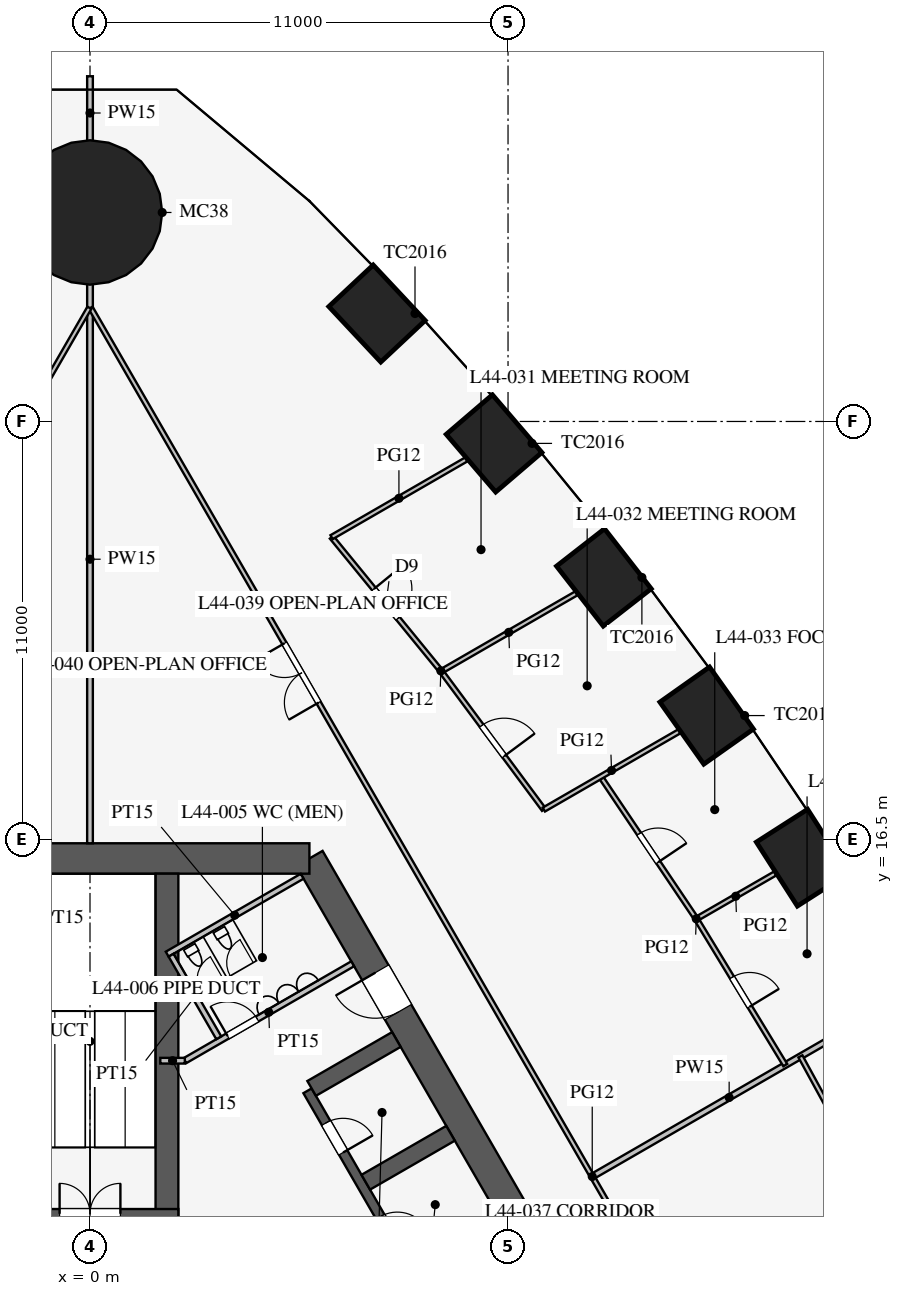
"""IFC4 building model, lengths in metres.
Left out: names, types, materials, properties, quantities, classifications, styles, units other than length and angle.
Written with IfcOpenShell. Run it as: python <this file> out.ifc"""

import sys

from ifc_helpers import new_model, si_unit, direction, frame, frame_2d, origin, origin_2d, place, context, subcontext, project, spatial, rectangle, circle, extrude, element, fill, save


model = new_model("IFC4")
c1 = context("Model", 3, precision=1e-05, world=origin(), true_north=direction((0.0, 1.0)))
c2 = subcontext(c1, "Body", "Model", "MODEL_VIEW")
j1 = project(units=[si_unit("LENGTHUNIT", "METRE"), si_unit("PLANEANGLEUNIT", "RADIAN")], contexts=[c1])
p1 = place(None, origin())
s1 = spatial("IfcSite", under=j1, at=p1, CompositionType="ELEMENT")
p2 = place(p1, origin())
s2 = spatial("IfcBuilding", under=s1, at=p2, CompositionType="ELEMENT")
p3 = place(p2, frame((0.0, 0.0, 193.9)))
s3 = spatial("IfcBuildingStorey", under=s2, at=p3, CompositionType="ELEMENT", Elevation=193.9)
for number, where, z_axis, x_axis in (
    (1, (18.748, 16.02, 0.0), (0.0, 0.0, 1.0), (-0.539, 0.842, 0.0)),
    (2, (16.227, 19.761, 0.0), (0.0, 0.0, 1.0), (-0.577, 0.816, 0.0)),
    (3, (13.522, 23.396, 0.0), (0.0, 0.0, 1.0), (-0.615, 0.789, 0.0)),
    (4, (10.632, 26.923, 0.0), (0.0, 0.0, 1.0), (-0.651, 0.759, 0.0)),
    (5, (7.552, 30.341, 0.0), (0.0, 0.0, 1.0), (-0.684, 0.73, 0.0)),
):
    element("IfcColumn", number, at=place(p3, frame(where, z_axis=z_axis, x_axis=x_axis)), inside=s3, PredefinedType="COLUMN", context=c2, shape_type="SweptSolid", body=[
        extrude(rectangle(XDim=2.0, YDim=1.6, at=origin_2d()), origin(), (0.0, 0.0, 1.0), 4.2),
    ])
p4 = place(p3, frame((0.0, 33.0, 0.0), z_axis=(0.0, 0.0, 1.0), x_axis=(1.0, 0.0, 0.0)))
e6 = element("IfcColumn", 6, at=p4, inside=s3, PredefinedType="COLUMN", context=c2, shape_type="SweptSolid", body=[
    extrude(circle(Radius=1.9, at=origin_2d()), origin(), (0.0, 0.0, 1.0), 4.2),
])
p5 = place(p3, frame((16.743, -3.0, 0.0), z_axis=(0.0, 0.0, 1.0), x_axis=(-0.500002442456, 0.866023993627, 0.0)))
e7 = element("IfcWall", 7, at=p5, inside=s3, PredefinedType="SHEAR", context=c2, shape_type="SweptSolid", body=[
    extrude(rectangle(XDim=21.939, YDim=0.8, at=frame_2d((10.97, 0.0))), origin(), (0.0, 0.0, 1.0), 4.2),
])
p6 = place(p5, frame((17.27, 0.0, 0.0)))
e8 = element("IfcOpeningElement", 8, at=p6, cuts=e7, PredefinedType="OPENING", context=c2, shape_type="SweptSolid", body=[
    extrude(rectangle(XDim=1.2, YDim=2.1, at=frame_2d((0.6, 1.05))), frame((0.0, 0.41, 0.0), z_axis=(0.0, -1.0, 0.0), x_axis=(1.0, 0.0, 0.0)), (0.0, 0.0, 1.0), 0.82),
])
p7 = place(p5, frame((3.47, 0.0, 0.0)))
e9 = element("IfcOpeningElement", 9, at=p7, cuts=e7, PredefinedType="OPENING", context=c2, shape_type="SweptSolid", body=[
    extrude(rectangle(XDim=1.2, YDim=2.1, at=frame_2d((0.6, 1.05))), frame((0.0, 0.41, 0.0), z_axis=(0.0, -1.0, 0.0), x_axis=(1.0, 0.0, 0.0)), (0.0, 0.0, 1.0), 0.82),
])
p8 = place(p3, frame((5.773, 16.0, 0.0), z_axis=(0.0, 0.0, 1.0), x_axis=(-1.0, 0.0, 0.0)))
e10 = element("IfcWall", 10, at=p8, inside=s3, PredefinedType="SHEAR", context=c2, shape_type="SweptSolid", body=[
    extrude(rectangle(XDim=11.547, YDim=0.8, at=frame_2d((5.773, 0.0))), origin(), (0.0, 0.0, 1.0), 4.2),
])
p9 = place(p3, frame((11.424, 0.014, 0.0), z_axis=(0.0, 0.0, 1.0), x_axis=(-0.500001763848, 0.866024385424, 0.0)))
e11 = element("IfcWall", 11, at=p9, inside=s3, PredefinedType="SHEAR", context=c2, shape_type="SweptSolid", body=[
    extrude(rectangle(XDim=11.4, YDim=0.25, at=frame_2d((5.7, 0.0))), origin(), (0.0, 0.0, 1.0), 4.2),
])
p10 = place(p9, frame((0.975, 0.0, 0.0)))
e12 = element("IfcOpeningElement", 12, at=p10, cuts=e11, PredefinedType="OPENING", context=c2, shape_type="SweptSolid", body=[
    extrude(rectangle(XDim=0.9, YDim=2.1, at=frame_2d((0.45, 1.05))), frame((0.0, 0.135, 0.0), z_axis=(0.0, -1.0, 0.0), x_axis=(1.0, 0.0, 0.0)), (0.0, 0.0, 1.0), 0.27),
])
p11 = place(p9, frame((3.825, 0.0, 0.0)))
e13 = element("IfcOpeningElement", 13, at=p11, cuts=e11, PredefinedType="OPENING", context=c2, shape_type="SweptSolid", body=[
    extrude(rectangle(XDim=0.9, YDim=2.1, at=frame_2d((0.45, 1.05))), frame((0.0, 0.135, 0.0), z_axis=(0.0, -1.0, 0.0), x_axis=(1.0, 0.0, 0.0)), (0.0, 0.0, 1.0), 0.27),
])
p12 = place(p9, frame((6.675, 0.0, 0.0)))
e14 = element("IfcOpeningElement", 14, at=p12, cuts=e11, PredefinedType="OPENING", context=c2, shape_type="SweptSolid", body=[
    extrude(rectangle(XDim=0.9, YDim=2.1, at=frame_2d((0.45, 1.05))), frame((0.0, 0.135, 0.0), z_axis=(0.0, -1.0, 0.0), x_axis=(1.0, 0.0, 0.0)), (0.0, 0.0, 1.0), 0.27),
])
p13 = place(p9, frame((9.525, 0.0, 0.0)))
e15 = element("IfcOpeningElement", 15, at=p13, cuts=e11, PredefinedType="OPENING", context=c2, shape_type="SweptSolid", body=[
    extrude(rectangle(XDim=0.9, YDim=2.1, at=frame_2d((0.45, 1.05))), frame((0.0, 0.135, 0.0), z_axis=(0.0, -1.0, 0.0), x_axis=(1.0, 0.0, 0.0)), (0.0, 0.0, 1.0), 0.27),
])
p14 = place(p3, frame((7.257, 7.481, 0.0), z_axis=(0.0, 0.0, 1.0), x_axis=(0.866046643894, 0.499963209246, 0.0)))
e16 = element("IfcWall", 16, at=p14, inside=s3, PredefinedType="SHEAR", context=c2, shape_type="SweptSolid", body=[
    extrude(rectangle(XDim=2.575, YDim=0.45, at=frame_2d((1.288, 0.0))), origin(), (0.0, 0.0, 1.0), 4.2),
])
p15 = place(p3, frame((5.832, 9.949, 0.0), z_axis=(0.0, 0.0, 1.0), x_axis=(0.866029291668, 0.499993265928, 0.0)))
e17 = element("IfcWall", 17, at=p15, inside=s3, PredefinedType="SHEAR", context=c2, shape_type="SweptSolid", body=[
    extrude(rectangle(XDim=2.575, YDim=0.45, at=frame_2d((1.288, 0.0))), origin(), (0.0, 0.0, 1.0), 4.2),
])
p16 = place(p3, frame((2.025, 6.525, 0.0), z_axis=(0.0, 0.0, 1.0), x_axis=(0.0, 1.0, 0.0)))
e18 = element("IfcWall", 18, at=p16, inside=s3, PredefinedType="SHEAR", context=c2, shape_type="SweptSolid", body=[
    extrude(rectangle(XDim=9.075, YDim=0.6, at=frame_2d((4.538, 0.0))), origin(), (0.0, 0.0, 1.0), 4.2),
])
p17 = place(p3, frame((2.325, 6.65, 0.0), z_axis=(0.0, 0.0, 1.0), x_axis=(-1.0, 0.0, 0.0)))
e19 = element("IfcWall", 19, at=p17, inside=s3, PredefinedType="SHEAR", context=c2, shape_type="SweptSolid", body=[
    extrude(rectangle(XDim=4.65, YDim=0.25, at=frame_2d((2.325, 0.0))), origin(), (0.0, 0.0, 1.0), 4.2),
])
p18 = place(p17, frame((1.525, 0.0, 0.0)))
e20 = element("IfcOpeningElement", 20, at=p18, cuts=e19, PredefinedType="OPENING", context=c2, shape_type="SweptSolid", body=[
    extrude(rectangle(XDim=1.6, YDim=2.1, at=frame_2d((0.8, 1.05))), frame((0.0, 0.135, 0.0), z_axis=(0.0, -1.0, 0.0), x_axis=(1.0, 0.0, 0.0)), (0.0, 0.0, 1.0), 0.27),
])
p19 = place(p3, frame((2.495, 10.678, 0.0), z_axis=(0.0, 0.0, 1.0), x_axis=(0.86602216432, 0.500005610874, 0.0)))
e21 = element("IfcWall", 21, at=p19, inside=s3, PredefinedType="PARTITIONING", context=c2, shape_type="SweptSolid", body=[
    extrude(rectangle(XDim=5.1, YDim=0.15, at=frame_2d((2.55, 0.0))), origin(), (0.0, 0.0, 1.0), 4.0),
])
p20 = place(p19, frame((1.3, 0.0, 0.0)))
e22 = element("IfcOpeningElement", 22, at=p20, cuts=e21, PredefinedType="OPENING", context=c2, shape_type="SweptSolid", body=[
    extrude(rectangle(XDim=0.9, YDim=2.1, at=frame_2d((0.45, 1.05))), frame((0.0, 0.085, 0.0), z_axis=(0.0, -1.0, 0.0), x_axis=(1.0, 0.0, 0.0)), (0.0, 0.0, 1.0), 0.17),
])
p21 = place(p3, frame((2.495, 10.678, 0.0), z_axis=(0.0, 0.0, 1.0), x_axis=(-1.0, 0.0, 0.0)))
e23 = element("IfcWall", 23, at=p21, inside=s3, PredefinedType="PARTITIONING", context=c2, shape_type="SweptSolid", body=[
    extrude(rectangle(XDim=0.645, YDim=0.15, at=frame_2d((0.323, 0.0))), origin(), (0.0, 0.0, 1.0), 4.0),
])
p22 = place(p3, frame((2.031, 13.482, 0.0), z_axis=(0.0, 0.0, 1.0), x_axis=(0.866050731258, 0.499956128963, 0.0)))
e24 = element("IfcWall", 24, at=p22, inside=s3, PredefinedType="PARTITIONING", context=c2, shape_type="SweptSolid", body=[
    extrude(rectangle(XDim=4.1, YDim=0.15, at=frame_2d((2.05, 0.0))), origin(), (0.0, 0.0, 1.0), 4.0),
])
p23 = place(p3, frame((3.389, 11.281, 0.0), z_axis=(0.0, 0.0, 1.0), x_axis=(-0.499989096993, 0.866031698547, 0.0)))
e25 = element("IfcWall", 25, at=p23, inside=s3, PredefinedType="PARTITIONING", context=c2, shape_type="SweptSolid", body=[
    extrude(rectangle(XDim=2.51, YDim=0.15, at=frame_2d((1.255, 0.0))), origin(), (0.0, 0.0, 1.0), 4.0),
])
p24 = place(p3, frame((0.0, 16.4, 0.0), z_axis=(0.0, 0.0, 1.0), x_axis=(0.0, 1.0, 0.0)))
e26 = element("IfcWall", 26, at=p24, inside=s3, PredefinedType="PARTITIONING", context=c2, shape_type="SweptSolid", body=[
    extrude(rectangle(XDim=14.95, YDim=0.15, at=frame_2d((7.475, 0.0))), origin(), (0.0, 0.0, 1.0), 2.4),
])
p25 = place(p3, frame((0.0, 34.65, 0.0), z_axis=(0.0, 0.0, 1.0), x_axis=(0.0, 1.0, 0.0)))
e27 = element("IfcWall", 27, at=p25, inside=s3, PredefinedType="PARTITIONING", context=c2, shape_type="SweptSolid", body=[
    extrude(rectangle(XDim=1.935, YDim=0.15, at=frame_2d((0.967, 0.0))), origin(), (0.0, 0.0, 1.0), 2.4),
])
p26 = place(p3, frame((13.268, 7.66, 0.0), z_axis=(0.0, 0.0, 1.0), x_axis=(0.866019499219, 0.500010226868, 0.0)))
e28 = element("IfcWall", 28, at=p26, inside=s3, PredefinedType="PARTITIONING", context=c2, shape_type="SweptSolid", body=[
    extrude(rectangle(XDim=8.2, YDim=0.15, at=frame_2d((4.1, 0.0))), origin(), (0.0, 0.0, 1.0), 2.992),
])
p27 = place(p3, frame((26.415, -15.231, 0.0), z_axis=(0.0, 0.0, 1.0), x_axis=(-0.50000091641, 0.866024874695, 0.0)))
e29 = element("IfcWall", 29, at=p27, inside=s3, PredefinedType="PARTITIONING", context=c2, shape_type="SweptSolid", body=[
    extrude(rectangle(XDim=52.796, YDim=0.12, at=frame_2d((26.398, 0.0))), origin(), (0.0, 0.0, 1.0), 2.9),
])
p28 = place(p27, frame((10.2, 0.0, 0.15)))
e30 = element("IfcOpeningElement", 30, at=p28, cuts=e29, PredefinedType="OPENING", context=c2, shape_type="SweptSolid", body=[
    extrude(rectangle(XDim=1.8, YDim=2.1, at=frame_2d((0.9, 1.05))), frame((0.0, 0.07, 0.0), z_axis=(0.0, -1.0, 0.0), x_axis=(1.0, 0.0, 0.0)), (0.0, 0.0, 1.0), 0.14),
])
p29 = place(p27, frame((40.8, 0.0, 0.15)))
e31 = element("IfcOpeningElement", 31, at=p29, cuts=e29, PredefinedType="OPENING", context=c2, shape_type="SweptSolid", body=[
    extrude(rectangle(XDim=1.8, YDim=2.1, at=frame_2d((0.9, 1.05))), frame((0.0, 0.07, 0.0), z_axis=(0.0, -1.0, 0.0), x_axis=(1.0, 0.0, 0.0)), (0.0, 0.0, 1.0), 0.14),
])
p30 = place(p3, frame((18.295, 10.563, 0.0), z_axis=(0.0, 0.0, 1.0), x_axis=(-0.519766265397, 0.854308509472, 0.0)))
e32 = element("IfcWall", 32, at=p30, inside=s3, PredefinedType="PARTITIONING", context=c2, shape_type="SweptSolid", body=[
    extrude(rectangle(XDim=4.501, YDim=0.12, at=frame_2d((2.25, 0.0))), origin(), (0.0, 0.0, 1.0), 2.9),
])
p31 = place(p30, frame((1.8, 0.0, 0.15)))
e33 = element("IfcOpeningElement", 33, at=p31, cuts=e32, PredefinedType="OPENING", context=c2, shape_type="SweptSolid", body=[
    extrude(rectangle(XDim=0.9, YDim=2.1, at=frame_2d((0.45, 1.05))), frame((0.0, 0.07, 0.0), z_axis=(0.0, -1.0, 0.0), x_axis=(1.0, 0.0, 0.0)), (0.0, 0.0, 1.0), 0.14),
])
p32 = place(p3, frame((9.242, 20.924, 0.0), z_axis=(0.0, 0.0, 1.0), x_axis=(-0.632765292047, 0.774343647989, 0.0)))
e34 = element("IfcWall", 34, at=p32, inside=s3, PredefinedType="PARTITIONING", context=c2, shape_type="SweptSolid", body=[
    extrude(rectangle(XDim=4.559, YDim=0.12, at=frame_2d((2.28, 0.0))), origin(), (0.0, 0.0, 1.0), 2.9),
])
p33 = place(p32, frame((1.8, 0.0, 0.15)))
e35 = element("IfcOpeningElement", 35, at=p33, cuts=e34, PredefinedType="OPENING", context=c2, shape_type="SweptSolid", body=[
    extrude(rectangle(XDim=1.0, YDim=2.1, at=frame_2d((0.5, 1.05))), frame((0.0, 0.07, 0.0), z_axis=(0.0, -1.0, 0.0), x_axis=(1.0, 0.0, 0.0)), (0.0, 0.0, 1.0), 0.14),
])
p34 = place(p3, frame((15.956, 14.408, 0.0), z_axis=(0.0, 0.0, 1.0), x_axis=(-0.55850386778, 0.829501916619, 0.0)))
e36 = element("IfcWall", 36, at=p34, inside=s3, PredefinedType="PARTITIONING", context=c2, shape_type="SweptSolid", body=[
    extrude(rectangle(XDim=4.511, YDim=0.12, at=frame_2d((2.255, 0.0))), origin(), (0.0, 0.0, 1.0), 2.9),
])
p35 = place(p34, frame((1.8, 0.0, 0.15)))
e37 = element("IfcOpeningElement", 37, at=p35, cuts=e36, PredefinedType="OPENING", context=c2, shape_type="SweptSolid", body=[
    extrude(rectangle(XDim=0.9, YDim=2.1, at=frame_2d((0.45, 1.05))), frame((0.0, 0.07, 0.0), z_axis=(0.0, -1.0, 0.0), x_axis=(1.0, 0.0, 0.0)), (0.0, 0.0, 1.0), 0.14),
])
p36 = place(p3, frame((11.943, 17.287, 0.0), z_axis=(0.0, 0.0, 1.0), x_axis=(-0.59613842716, 0.802881669777, 0.0)))
e38 = element("IfcWall", 38, at=p36, inside=s3, PredefinedType="PARTITIONING", context=c2, shape_type="SweptSolid", body=[
    extrude(rectangle(XDim=4.53, YDim=0.12, at=frame_2d((2.265, 0.0))), origin(), (0.0, 0.0, 1.0), 2.9),
])
p37 = place(p36, frame((1.75, 0.0, 0.15)))
e39 = element("IfcOpeningElement", 39, at=p37, cuts=e38, PredefinedType="OPENING", context=c2, shape_type="SweptSolid", body=[
    extrude(rectangle(XDim=1.0, YDim=2.1, at=frame_2d((0.5, 1.05))), frame((0.0, 0.07, 0.0), z_axis=(0.0, -1.0, 0.0), x_axis=(1.0, 0.0, 0.0)), (0.0, 0.0, 1.0), 0.14),
])
p38 = place(p3, frame((20.854, 6.844, 0.0), z_axis=(0.0, 0.0, 1.0), x_axis=(-0.480014565702, 0.877260518155, 0.0)))
e40 = element("IfcWall", 40, at=p38, inside=s3, PredefinedType="PARTITIONING", context=c2, shape_type="SweptSolid", body=[
    extrude(rectangle(XDim=4.501, YDim=0.12, at=frame_2d((2.25, 0.0))), origin(), (0.0, 0.0, 1.0), 2.9),
])
p39 = place(p38, frame((1.8, 0.0, 0.15)))
e41 = element("IfcOpeningElement", 41, at=p39, cuts=e40, PredefinedType="OPENING", context=c2, shape_type="SweptSolid", body=[
    extrude(rectangle(XDim=0.9, YDim=2.1, at=frame_2d((0.45, 1.05))), frame((0.0, 0.07, 0.0), z_axis=(0.0, -1.0, 0.0), x_axis=(1.0, 0.0, 0.0)), (0.0, 0.0, 1.0), 0.14),
])
p40 = place(p3, frame((9.242, 20.924, 0.0), z_axis=(0.0, 0.0, 1.0), x_axis=(0.866016197294, 0.500015945769, 0.0)))
e42 = element("IfcWall", 42, at=p40, inside=s3, PredefinedType="PARTITIONING", context=c2, shape_type="SweptSolid", body=[
    extrude(rectangle(XDim=4.104, YDim=0.12, at=frame_2d((2.052, 0.0))), origin(), (0.0, 0.0, 1.0), 2.8),
])
p41 = place(p3, frame((6.357, 24.455, 0.0), z_axis=(0.0, 0.0, 1.0), x_axis=(0.866005746929, 0.500034045127, 0.0)))
e43 = element("IfcWall", 43, at=p41, inside=s3, PredefinedType="PARTITIONING", context=c2, shape_type="SweptSolid", body=[
    extrude(rectangle(XDim=4.092, YDim=0.12, at=frame_2d((2.046, 0.0))), origin(), (0.0, 0.0, 1.0), 2.8),
])
p42 = place(p3, frame((15.956, 14.408, 0.0), z_axis=(0.0, 0.0, 1.0), x_axis=(0.86598681336, 0.50006683462, 0.0)))
e44 = element("IfcWall", 44, at=p42, inside=s3, PredefinedType="PARTITIONING", context=c2, shape_type="SweptSolid", body=[
    extrude(rectangle(XDim=2.393, YDim=0.12, at=frame_2d((1.197, 0.0))), origin(), (0.0, 0.0, 1.0), 2.9),
])
p43 = place(p3, frame((11.943, 17.287, 0.0), z_axis=(0.0, 0.0, 1.0), x_axis=(0.866013591525, 0.500020458876, 0.0)))
e45 = element("IfcWall", 45, at=p43, inside=s3, PredefinedType="PARTITIONING", context=c2, shape_type="SweptSolid", body=[
    extrude(rectangle(XDim=4.113, YDim=0.12, at=frame_2d((2.057, 0.0))), origin(), (0.0, 0.0, 1.0), 2.9),
])
p44 = place(p3, frame((-0.016, 30.491, 0.0), z_axis=(0.0, 0.0, 1.0), x_axis=(-0.50000091641, -0.866024874695, 0.0)))
e46 = element("IfcWall", 46, at=p44, inside=s3, PredefinedType="PARTITIONING", context=c2, shape_type="SweptSolid", body=[
    extrude(rectangle(XDim=52.796, YDim=0.12, at=frame_2d((26.398, 0.0))), origin(), (0.0, 0.0, 1.0), 2.9),
])
p45 = place(p44, frame((10.2, 0.0, 0.15)))
e47 = element("IfcOpeningElement", 47, at=p45, cuts=e46, PredefinedType="OPENING", context=c2, shape_type="SweptSolid", body=[
    extrude(rectangle(XDim=1.8, YDim=2.1, at=frame_2d((0.9, 1.05))), frame((0.0, 0.07, 0.0), z_axis=(0.0, -1.0, 0.0), x_axis=(1.0, 0.0, 0.0)), (0.0, 0.0, 1.0), 0.14),
])
p46 = place(p44, frame((40.8, 0.0, 0.15)))
e48 = element("IfcOpeningElement", 48, at=p46, cuts=e46, PredefinedType="OPENING", context=c2, shape_type="SweptSolid", body=[
    extrude(rectangle(XDim=1.8, YDim=2.1, at=frame_2d((0.9, 1.05))), frame((0.0, 0.07, 0.0), z_axis=(0.0, -1.0, 0.0), x_axis=(1.0, 0.0, 0.0)), (0.0, 0.0, 1.0), 0.14),
])
p47 = place(p20, origin())
e49 = element("IfcDoor", 49, at=p47, inside=s3, OperationType="SINGLE_SWING_LEFT", PredefinedType="DOOR", context=c2, shape_type="SweptSolid", body=[
    extrude(rectangle(XDim=0.9, YDim=2.1, at=frame_2d((0.45, 1.05))), frame((0.0, 0.025, 0.0), z_axis=(0.0, -1.0, 0.0), x_axis=(1.0, 0.0, 0.0)), (0.0, 0.0, 1.0), 0.05),
])
fill(e22, e49)
p48 = place(p18, frame((1.6, 0.0, 0.0), z_axis=(0.0, 0.0, 1.0), x_axis=(-1.0, 0.0, 0.0)))
e50 = element("IfcDoor", 50, at=p48, inside=s3, OperationType="DOUBLE_DOOR_SINGLE_SWING", PredefinedType="DOOR", context=c2, shape_type="SweptSolid", body=[
    extrude(rectangle(XDim=1.6, YDim=2.1, at=frame_2d((0.8, 1.05))), frame((0.0, 0.025, 0.0), z_axis=(0.0, -1.0, 0.0), x_axis=(1.0, 0.0, 0.0)), (0.0, 0.0, 1.0), 0.05),
])
fill(e20, e50)
p49 = place(p6, origin())
e51 = element("IfcDoor", 51, at=p49, inside=s3, OperationType="SINGLE_SWING_RIGHT", PredefinedType="DOOR", context=c2, shape_type="SweptSolid", body=[
    extrude(rectangle(XDim=1.2, YDim=2.1, at=frame_2d((0.6, 1.05))), frame((0.0, 0.025, 0.0), z_axis=(0.0, -1.0, 0.0), x_axis=(1.0, 0.0, 0.0)), (0.0, 0.0, 1.0), 0.05),
])
fill(e8, e51)
p50 = place(p13, frame((0.9, 0.0, 0.0), z_axis=(0.0, 0.0, 1.0), x_axis=(-1.0, 0.0, 0.0)))
e52 = element("IfcDoor", 52, at=p50, inside=s3, OperationType="SINGLE_SWING_RIGHT", PredefinedType="DOOR", context=c2, shape_type="SweptSolid", body=[
    extrude(rectangle(XDim=0.9, YDim=2.1, at=frame_2d((0.45, 1.05))), frame((0.0, 0.025, 0.0), z_axis=(0.0, -1.0, 0.0), x_axis=(1.0, 0.0, 0.0)), (0.0, 0.0, 1.0), 0.05),
])
fill(e15, e52)
p51 = place(p33, frame((1.0, 0.0, 0.0), z_axis=(0.0, 0.0, 1.0), x_axis=(-1.0, 0.0, 0.0)))
e53 = element("IfcDoor", 53, at=p51, inside=s3, OperationType="SINGLE_SWING_LEFT", PredefinedType="DOOR", context=c2, shape_type="SweptSolid", body=[
    extrude(rectangle(XDim=1.0, YDim=2.1, at=frame_2d((0.5, 1.05))), frame((0.0, 0.025, 0.0), z_axis=(0.0, -1.0, 0.0), x_axis=(1.0, 0.0, 0.0)), (0.0, 0.0, 1.0), 0.05),
])
fill(e35, e53)
p52 = place(p37, frame((1.0, 0.0, 0.0), z_axis=(0.0, 0.0, 1.0), x_axis=(-1.0, 0.0, 0.0)))
e54 = element("IfcDoor", 54, at=p52, inside=s3, OperationType="SINGLE_SWING_RIGHT", PredefinedType="DOOR", context=c2, shape_type="SweptSolid", body=[
    extrude(rectangle(XDim=1.0, YDim=2.1, at=frame_2d((0.5, 1.05))), frame((0.0, 0.025, 0.0), z_axis=(0.0, -1.0, 0.0), x_axis=(1.0, 0.0, 0.0)), (0.0, 0.0, 1.0), 0.05),
])
fill(e39, e54)
p53 = place(p35, frame((0.9, 0.0, 0.0), z_axis=(0.0, 0.0, 1.0), x_axis=(-1.0, 0.0, 0.0)))
e55 = element("IfcDoor", 55, at=p53, inside=s3, OperationType="SINGLE_SWING_RIGHT", PredefinedType="DOOR", context=c2, shape_type="SweptSolid", body=[
    extrude(rectangle(XDim=0.9, YDim=2.1, at=frame_2d((0.45, 1.05))), frame((0.0, 0.025, 0.0), z_axis=(0.0, -1.0, 0.0), x_axis=(1.0, 0.0, 0.0)), (0.0, 0.0, 1.0), 0.05),
])
fill(e37, e55)
p54 = place(p31, frame((0.9, 0.0, 0.0), z_axis=(0.0, 0.0, 1.0), x_axis=(-1.0, 0.0, 0.0)))
e56 = element("IfcDoor", 56, at=p54, inside=s3, OperationType="SINGLE_SWING_RIGHT", PredefinedType="DOOR", context=c2, shape_type="SweptSolid", body=[
    extrude(rectangle(XDim=0.9, YDim=2.1, at=frame_2d((0.45, 1.05))), frame((0.0, 0.025, 0.0), z_axis=(0.0, -1.0, 0.0), x_axis=(1.0, 0.0, 0.0)), (0.0, 0.0, 1.0), 0.05),
])
fill(e33, e56)
p55 = place(p29, origin())
e57 = element("IfcDoor", 57, at=p55, inside=s3, OperationType="DOUBLE_DOOR_SINGLE_SWING", PredefinedType="DOOR", context=c2, shape_type="SweptSolid", body=[
    extrude(rectangle(XDim=1.8, YDim=2.1, at=frame_2d((0.9, 1.05))), frame((0.0, 0.025, 0.0), z_axis=(0.0, -1.0, 0.0), x_axis=(1.0, 0.0, 0.0)), (0.0, 0.0, 1.0), 0.05),
])
fill(e31, e57)
save(model, sys.argv[1])
